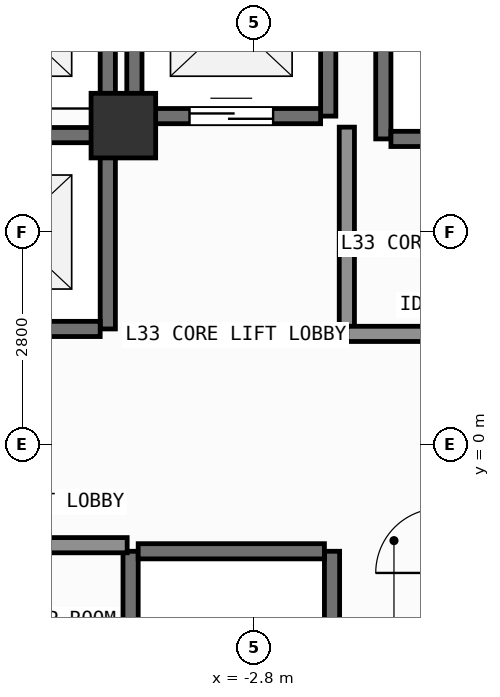
"""IFC4 building model, lengths in metres.
Left out: names, types, materials, properties, quantities, classifications, styles, units other than length and angle.
Written with IfcOpenShell. Run it as: python <this file> out.ifc"""

import sys

from ifc_helpers import new_model, si_unit, direction, frame, frame_2d, origin, origin_2d, place, context, subcontext, project, spatial, rectangle, extrude, element, fill, save


model = new_model("IFC4")
c1 = context("Model", 3, precision=1e-05, world=origin(), true_north=direction((0.0, 1.0)))
c2 = subcontext(c1, "Body", "Model", "MODEL_VIEW")
j1 = project(units=[si_unit("LENGTHUNIT", "METRE"), si_unit("PLANEANGLEUNIT", "RADIAN")], contexts=[c1])
p1 = place(None, origin())
s1 = spatial("IfcSite", under=j1, at=p1, CompositionType="ELEMENT")
p2 = place(p1, origin())
s2 = spatial("IfcBuilding", under=s1, at=p2, CompositionType="ELEMENT")
p3 = place(p2, frame((0.0, 0.0, 132.9)))
s3 = spatial("IfcBuildingStorey", under=s2, at=p3, CompositionType="ELEMENT", Elevation=132.9)
p4 = place(p3, frame((-4.52, 4.2, 0.0), z_axis=(0.0, 0.0, 1.0), x_axis=(1.0, 0.0, 0.0)))
e1 = element("IfcColumn", 1, at=p4, inside=s3, PredefinedType="COLUMN", context=c2, shape_type="SweptSolid", body=[
    extrude(rectangle(XDim=0.85, YDim=0.85, at=origin_2d()), origin(), (0.0, 0.0, 1.0), 3.9),
])
p5 = place(p3, frame((-4.725, 1.525, 0.0), z_axis=(0.0, 0.0, 1.0), x_axis=(0.0, 1.0, 0.0)))
e2 = element("IfcWall", 2, at=p5, inside=s3, PredefinedType="SHEAR", context=c2, shape_type="SweptSolid", body=[
    extrude(rectangle(XDim=2.55, YDim=0.2, at=frame_2d((1.275, 0.0))), origin(), (0.0, 0.0, 1.0), 3.62),
])
for number, where, z_axis, x_axis in (
    (3, (-7.175, 1.525, 0.0), (0.0, 0.0, 1.0), (1.0, 0.0, 0.0)),
    (4, (-7.175, 4.075, 0.0), (0.0, 0.0, 1.0), (1.0, 0.0, 0.0)),
):
    element("IfcWall", number, at=place(p3, frame(where, z_axis=z_axis, x_axis=x_axis)), inside=s3, PredefinedType="SHEAR", context=c2, shape_type="SweptSolid", body=[
        extrude(rectangle(XDim=2.35, YDim=0.2, at=frame_2d((1.175, 0.0))), origin(), (0.0, 0.0, 1.0), 3.62),
    ])
p6 = place(p3, frame((-4.725, 4.075, 0.0), z_axis=(0.0, 0.0, 1.0), x_axis=(0.0, 1.0, 0.0)))
e5 = element("IfcWall", 5, at=p6, inside=s3, PredefinedType="SHEAR", context=c2, shape_type="SweptSolid", body=[
    extrude(rectangle(XDim=2.8, YDim=0.2, at=frame_2d((1.4, 0.0))), origin(), (0.0, 0.0, 1.0), 3.62),
])
for number, where, z_axis, x_axis in (
    (6, (-4.375, 4.325, 0.0), (0.0, 0.0, 1.0), (0.0, 1.0, 0.0)),
    (7, (-1.825, 4.325, 0.0), (0.0, 0.0, 1.0), (0.0, 1.0, 0.0)),
):
    element("IfcWall", number, at=place(p3, frame(where, z_axis=z_axis, x_axis=x_axis)), inside=s3, PredefinedType="SHEAR", context=c2, shape_type="SweptSolid", body=[
        extrude(rectangle(XDim=2.55, YDim=0.2, at=frame_2d((1.275, 0.0))), origin(), (0.0, 0.0, 1.0), 3.62),
    ])
p7 = place(p3, frame((-4.275, 4.325, 0.0), z_axis=(0.0, 0.0, 1.0), x_axis=(1.0, 0.0, 0.0)))
e8 = element("IfcWall", 8, at=p7, inside=s3, PredefinedType="SHEAR", context=c2, shape_type="SweptSolid", body=[
    extrude(rectangle(XDim=2.35, YDim=0.2, at=frame_2d((1.175, 0.0))), origin(), (0.0, 0.0, 1.0), 3.62),
])
p8 = place(p7, frame((0.625, 0.0, 0.0)))
e9 = element("IfcOpeningElement", 9, at=p8, cuts=e8, PredefinedType="OPENING", context=c2, shape_type="SweptSolid", body=[
    extrude(rectangle(XDim=1.1, YDim=2.2, at=frame_2d((0.55, 1.1))), frame((0.0, 0.11, 0.0), z_axis=(0.0, -1.0, 0.0), x_axis=(1.0, 0.0, 0.0)), (0.0, 0.0, 1.0), 0.22),
])
for number, where, z_axis, x_axis in (
    (10, (-4.425, -4.2, 0.0), (0.0, 0.0, 1.0), (0.0, 1.0, 0.0)),
    (11, (-1.775, -4.2, 0.0), (0.0, 0.0, 1.0), (0.0, 1.0, 0.0)),
):
    element("IfcWall", number, at=place(p3, frame(where, z_axis=z_axis, x_axis=x_axis)), inside=s3, PredefinedType="SHEAR", context=c2, shape_type="SweptSolid", body=[
        extrude(rectangle(XDim=2.8, YDim=0.2, at=frame_2d((1.4, 0.0))), origin(), (0.0, 0.0, 1.0), 3.62),
    ])
p9 = place(p3, frame((-4.325, -1.4, 0.0), z_axis=(0.0, 0.0, 1.0), x_axis=(1.0, 0.0, 0.0)))
e12 = element("IfcWall", 12, at=p9, inside=s3, PredefinedType="SHEAR", context=c2, shape_type="SweptSolid", body=[
    extrude(rectangle(XDim=2.45, YDim=0.2, at=frame_2d((1.225, 0.0))), origin(), (0.0, 0.0, 1.0), 3.62),
])
p10 = place(p3, frame((-1.1, 4.025, 0.0), z_axis=(0.0, 0.0, 1.0), x_axis=(0.0, 1.0, 0.0)))
e13 = element("IfcWall", 13, at=p10, inside=s3, PredefinedType="SHEAR", context=c2, shape_type="SweptSolid", body=[
    extrude(rectangle(XDim=3.15, YDim=0.2, at=frame_2d((1.575, 0.0))), origin(), (0.0, 0.0, 1.0), 3.62),
])
p11 = place(p3, frame((-1.0, 4.025, 0.0), z_axis=(0.0, 0.0, 1.0), x_axis=(1.0, 0.0, 0.0)))
e14 = element("IfcWall", 14, at=p11, inside=s3, PredefinedType="SHEAR", context=c2, shape_type="SweptSolid", body=[
    extrude(rectangle(XDim=2.4, YDim=0.2, at=frame_2d((1.2, 0.0))), origin(), (0.0, 0.0, 1.0), 3.62),
])
p12 = place(p3, frame((-7.38, -1.32, 0.0), z_axis=(0.0, 0.0, 1.0), x_axis=(1.0, 0.0, 0.0)))
e15 = element("IfcWall", 15, at=p12, inside=s3, PredefinedType="SOLIDWALL", context=c2, shape_type="SweptSolid", body=[
    extrude(rectangle(XDim=2.91, YDim=0.2, at=frame_2d((1.455, 0.0))), origin(), (0.0, 0.0, 1.0), 3.62),
])
p13 = place(p3, frame((-1.58, 1.48, 0.0), z_axis=(0.0, 0.0, 1.0), x_axis=(0.0, 1.0, 0.0)))
e16 = element("IfcWall", 16, at=p13, inside=s3, PredefinedType="SOLIDWALL", context=c2, shape_type="SweptSolid", body=[
    extrude(rectangle(XDim=2.7, YDim=0.2, at=frame_2d((1.35, 0.0))), origin(), (0.0, 0.0, 1.0), 3.62),
])
p14 = place(p3, frame((-1.58, 1.46, 0.0), z_axis=(0.0, 0.0, 1.0), x_axis=(1.0, 0.0, 0.0)))
e17 = element("IfcWall", 17, at=p14, inside=s3, PredefinedType="SOLIDWALL", context=c2, shape_type="SweptSolid", body=[
    extrude(rectangle(XDim=3.19, YDim=0.2, at=frame_2d((1.595, 0.0))), origin(), (0.0, 0.0, 1.0), 3.62),
])
p15 = place(p8, origin())
e18 = element("IfcDoor", 18, at=p15, inside=s3, OperationType="SLIDING_TO_LEFT", PredefinedType="DOOR", context=c2, shape_type="SweptSolid", body=[
    extrude(rectangle(XDim=1.1, YDim=2.2, at=frame_2d((0.55, 1.1))), frame((0.0, 0.025, 0.0), z_axis=(0.0, -1.0, 0.0), x_axis=(1.0, 0.0, 0.0)), (0.0, 0.0, 1.0), 0.05),
])
fill(e9, e18)
save(model, sys.argv[1])
